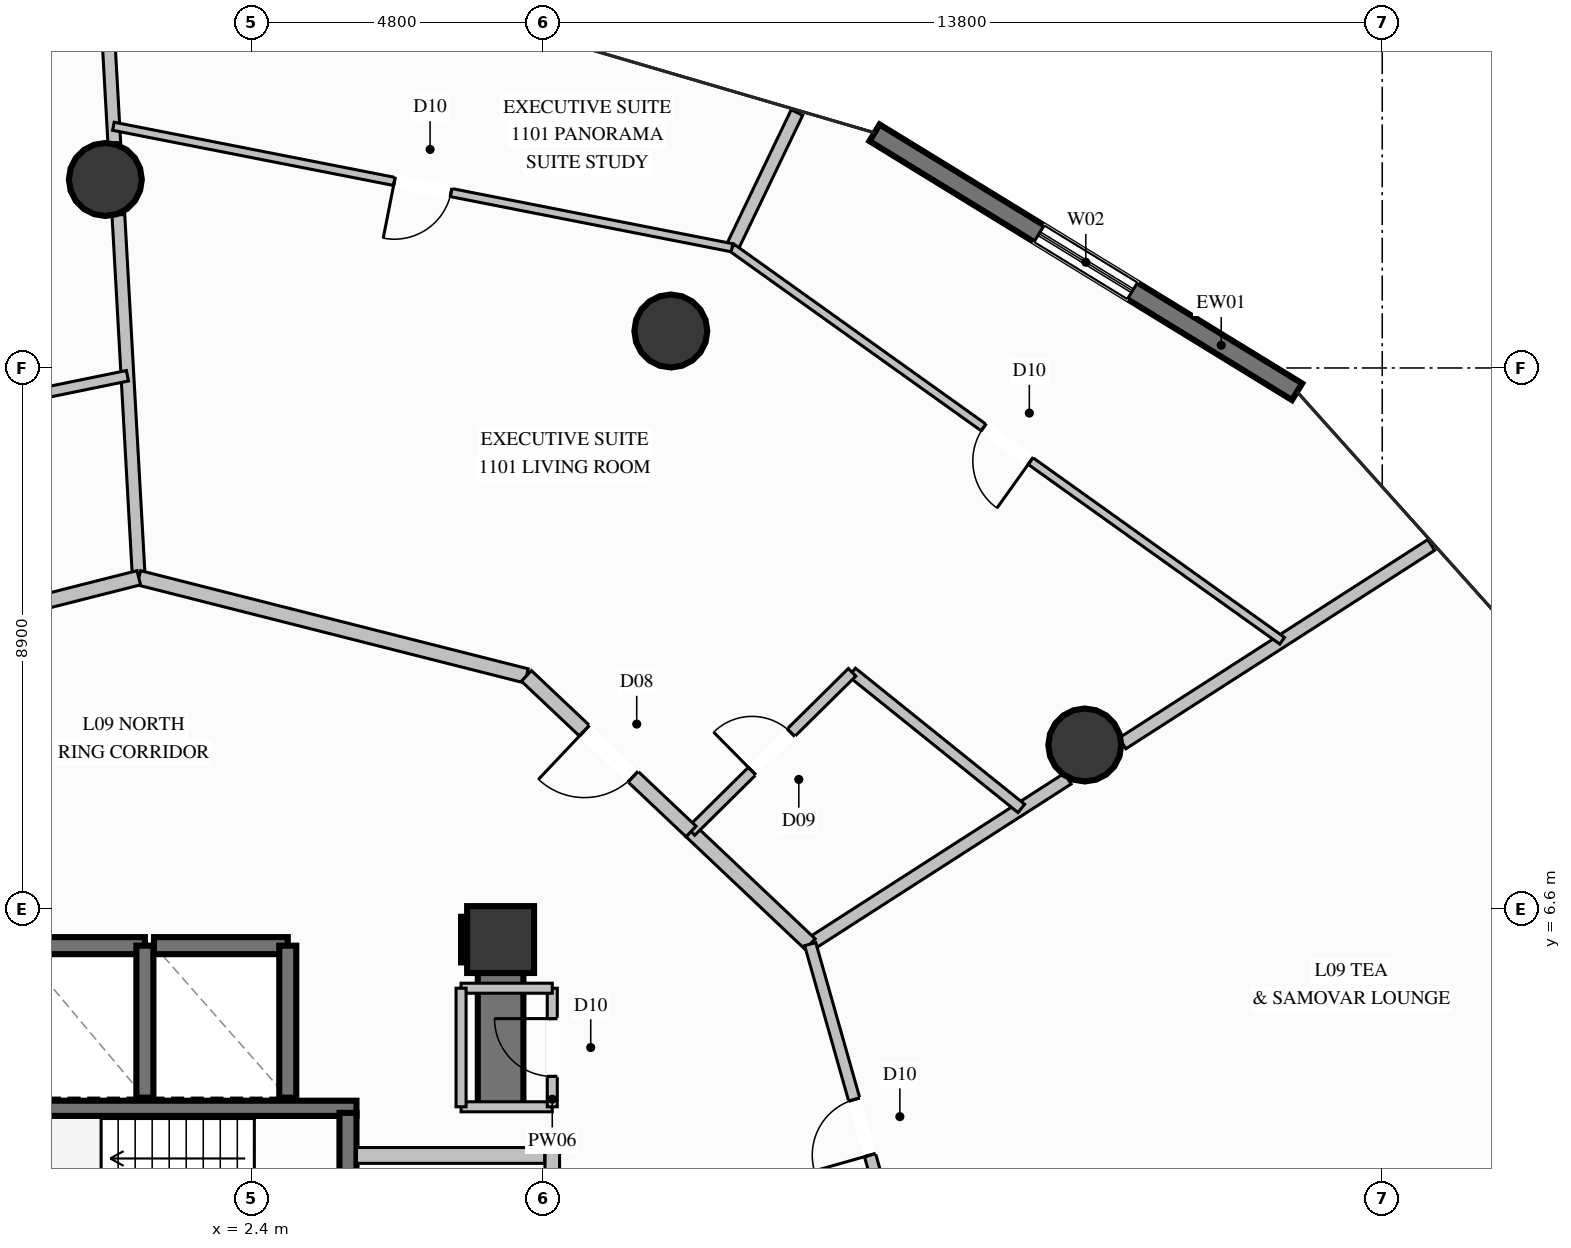
"""IFC4 building model, lengths in metres.
Left out: names, types, materials, properties, quantities, classifications, styles, units other than length and angle.
Written with IfcOpenShell. Run it as: python <this file> out.ifc"""

import sys

from ifc_helpers import new_model, si_unit, direction, frame, frame_2d, origin, origin_2d, place, context, subcontext, project, spatial, rectangle, circle, extrude, element, fill, save


model = new_model("IFC4")
c1 = context("Model", 3, precision=1e-05, world=origin(), true_north=direction((0.0, 1.0)))
c2 = subcontext(c1, "Body", "Model", "MODEL_VIEW")
j1 = project(units=[si_unit("LENGTHUNIT", "METRE"), si_unit("PLANEANGLEUNIT", "RADIAN")], contexts=[c1])
p1 = place(None, origin())
s1 = spatial("IfcSite", under=j1, at=p1, CompositionType="ELEMENT")
p2 = place(p1, origin())
s2 = spatial("IfcBuilding", under=s1, at=p2, CompositionType="ELEMENT")
p3 = place(p2, frame((0.0, 0.0, 42.8)))
s3 = spatial("IfcBuildingStorey", under=s2, at=p3, CompositionType="ELEMENT", Elevation=42.8)
p4 = place(p3, frame((6.5, 6.1, 0.0), z_axis=(0.0, 0.0, 1.0), x_axis=(1.0, 0.0, 0.0)))
e1 = element("IfcColumn", 1, at=p4, inside=s3, PredefinedType="COLUMN", context=c2, shape_type="SweptSolid", body=[
    extrude(rectangle(XDim=1.1, YDim=1.1, at=origin_2d()), origin(), (0.0, 0.0, 1.0), 3.6),
])
p5 = place(p3, frame((-4.13, 3.325, 0.0), z_axis=(0.0, 0.0, 1.0), x_axis=(1.0, 0.0, 0.0)))
e2 = element("IfcWall", 2, at=p5, inside=s3, PredefinedType="SOLIDWALL", context=c2, shape_type="SweptSolid", body=[
    extrude(rectangle(XDim=8.26, YDim=0.25, at=frame_2d((4.13, 0.0))), origin(), (0.0, 0.0, 1.0), 3.6),
])
p6 = place(p3, frame((5.85, 6.1, 0.0), z_axis=(0.0, 0.0, 1.0), x_axis=(1.0, 0.0, 0.0)))
e3 = element("IfcWall", 3, at=p6, inside=s3, PredefinedType="SHEAR", context=c2, shape_type="SweptSolid", body=[
    extrude(rectangle(XDim=0.275, YDim=0.75, at=frame_2d((0.137, 0.0))), origin(), (0.0, 0.0, 1.0), 3.6),
])
p7 = place(p3, frame((6.5, 3.35, 0.0), z_axis=(0.0, 0.0, 1.0), x_axis=(0.0, 1.0, 0.0)))
e4 = element("IfcWall", 4, at=p7, inside=s3, PredefinedType="SHEAR", context=c2, shape_type="SweptSolid", body=[
    extrude(rectangle(XDim=3.125, YDim=0.75, at=frame_2d((1.562, 0.0))), origin(), (0.0, 0.0, 1.0), 3.6),
])
for number, where, z_axis, x_axis in (
    (5, (16.108, 9.3, 0.0), (0.0, 0.0, 1.0), (1.0, 0.0, 0.0)),
    (6, (9.3, 16.108, 0.0), (0.0, 0.0, 1.0), (1.0, 0.0, 0.0)),
    (7, (0.0, 18.6, 0.0), (0.0, 0.0, 1.0), (1.0, 0.0, 0.0)),
):
    element("IfcColumn", number, at=place(p3, frame(where, z_axis=z_axis, x_axis=x_axis)), inside=s3, PredefinedType="COLUMN", context=c2, shape_type="SweptSolid", body=[
        extrude(circle(Radius=0.6, at=origin_2d()), origin(), (0.0, 0.0, 1.0), 3.6),
    ])
p8 = place(p3, frame((12.65, 19.368, 0.0), z_axis=(0.0, 0.0, 1.0), x_axis=(0.852610292859, -0.522547307438, 0.0)))
e8 = element("IfcWall", 8, at=p8, inside=s3, PredefinedType="SOLIDWALL", context=c2, shape_type="SweptSolid", body=[
    extrude(rectangle(XDim=8.151, YDim=0.32, at=frame_2d((4.075, 0.0))), origin(), (0.0, 0.0, 1.0), 3.34),
])
p9 = place(p8, frame((3.175, 0.0, 0.35)))
e9 = element("IfcOpeningElement", 9, at=p9, cuts=e8, PredefinedType="OPENING", context=c2, shape_type="SweptSolid", body=[
    extrude(rectangle(XDim=1.8, YDim=2.6, at=frame_2d((0.9, 1.3))), frame((0.0, 0.17, 0.0), z_axis=(0.0, -1.0, 0.0), x_axis=(1.0, 0.0, 0.0)), (0.0, 0.0, 1.0), 0.34),
])
p10 = place(p3, frame((0.65, 6.0, 0.0), z_axis=(0.0, 0.0, 1.0), x_axis=(-1.0, 0.0, 0.0)))
e10 = element("IfcWall", 10, at=p10, inside=s3, PredefinedType="SOLIDWALL", context=c2, shape_type="SweptSolid", body=[
    extrude(rectangle(XDim=2.1, YDim=0.28, at=frame_2d((1.05, 0.0))), origin(), (0.0, 0.0, 1.0), 3.34),
])
p11 = place(p3, frame((0.65, 3.5, 0.0), z_axis=(0.0, 0.0, 1.0), x_axis=(0.0, 1.0, 0.0)))
e11 = element("IfcWall", 11, at=p11, inside=s3, PredefinedType="SOLIDWALL", context=c2, shape_type="SweptSolid", body=[
    extrude(rectangle(XDim=2.5, YDim=0.28, at=frame_2d((1.25, 0.0))), origin(), (0.0, 0.0, 1.0), 3.34),
])
p12 = place(p3, frame((3.0, 6.0, 0.0), z_axis=(0.0, 0.0, 1.0), x_axis=(-1.0, 0.0, 0.0)))
e12 = element("IfcWall", 12, at=p12, inside=s3, PredefinedType="SOLIDWALL", context=c2, shape_type="SweptSolid", body=[
    extrude(rectangle(XDim=2.2, YDim=0.28, at=frame_2d((1.1, 0.0))), origin(), (0.0, 0.0, 1.0), 3.34),
])
p13 = place(p3, frame((3.0, 3.5, 0.0), z_axis=(0.0, 0.0, 1.0), x_axis=(0.0, 1.0, 0.0)))
e13 = element("IfcWall", 13, at=p13, inside=s3, PredefinedType="SOLIDWALL", context=c2, shape_type="SweptSolid", body=[
    extrude(rectangle(XDim=2.5, YDim=0.28, at=frame_2d((1.25, 0.0))), origin(), (0.0, 0.0, 1.0), 3.34),
])
p14 = place(p3, frame((3.99, -2.21, 0.0), z_axis=(0.0, 0.0, 1.0), x_axis=(0.0, 1.0, 0.0)))
e14 = element("IfcWall", 14, at=p14, inside=s3, PredefinedType="SOLIDWALL", context=c2, shape_type="SweptSolid", body=[
    extrude(rectangle(XDim=5.46, YDim=0.28, at=frame_2d((2.73, 0.0))), origin(), (0.0, 0.0, 1.0), 3.34),
])
p15 = place(p14, frame((3.323, 0.0, 0.0)))
e15 = element("IfcOpeningElement", 15, at=p15, cuts=e14, PredefinedType="OPENING", context=c2, shape_type="SweptSolid", body=[
    extrude(rectangle(XDim=1.2, YDim=2.2, at=frame_2d((0.6, 1.1))), frame((0.0, 0.15, 0.0), z_axis=(0.0, -1.0, 0.0), x_axis=(1.0, 0.0, 0.0)), (0.0, 0.0, 1.0), 0.3),
])
p16 = place(p3, frame((7.35, -2.34, 0.0), z_axis=(0.0, 0.0, 1.0), x_axis=(0.0, 1.0, 0.0)))
e16 = element("IfcWall", 16, at=p16, inside=s3, PredefinedType="PARTITIONING", context=c2, shape_type="SweptSolid", body=[
    extrude(rectangle(XDim=5.02, YDim=0.24, at=frame_2d((2.51, 0.0))), origin(), (0.0, 0.0, 1.0), 2.425),
])
p17 = place(p16, frame((2.515, 0.0, 0.0)))
e17 = element("IfcOpeningElement", 17, at=p17, cuts=e16, PredefinedType="OPENING", context=c2, shape_type="SweptSolid", body=[
    extrude(rectangle(XDim=1.15, YDim=2.2, at=frame_2d((0.575, 1.1))), frame((0.0, 0.13, 0.0), z_axis=(0.0, -1.0, 0.0), x_axis=(1.0, 0.0, 0.0)), (0.0, 0.0, 1.0), 0.26),
])
p18 = place(p3, frame((4.13, 2.55, 0.0), z_axis=(0.0, 0.0, 1.0), x_axis=(1.0, 0.0, 0.0)))
e18 = element("IfcWall", 18, at=p18, inside=s3, PredefinedType="PARTITIONING", context=c2, shape_type="SweptSolid", body=[
    extrude(rectangle(XDim=3.095, YDim=0.26, at=frame_2d((1.548, 0.0))), origin(), (0.0, 0.0, 1.0), 3.34),
])
p19 = place(p3, frame((5.85, 3.35, 0.0), z_axis=(0.0, 0.0, 1.0), x_axis=(1.0, 0.0, 0.0)))
e19 = element("IfcWall", 19, at=p19, inside=s3, PredefinedType="PARTITIONING", context=c2, shape_type="SweptSolid", body=[
    extrude(rectangle(XDim=1.5, YDim=0.165, at=frame_2d((0.75, 0.0))), origin(), (0.0, 0.0, 1.0), 3.34),
])
p20 = place(p3, frame((7.35, 3.35, 0.0), z_axis=(0.0, 0.0, 1.0), x_axis=(0.0, 1.0, 0.0)))
e20 = element("IfcWall", 20, at=p20, inside=s3, PredefinedType="PARTITIONING", context=c2, shape_type="SweptSolid", body=[
    extrude(rectangle(XDim=1.95, YDim=0.165, at=frame_2d((0.975, 0.0))), origin(), (0.0, 0.0, 1.0), 3.34),
])
p21 = place(p20, frame((0.5, 0.0, 0.0)))
e21 = element("IfcOpeningElement", 21, at=p21, cuts=e20, PredefinedType="OPENING", context=c2, shape_type="SweptSolid", body=[
    extrude(rectangle(XDim=0.95, YDim=2.1, at=frame_2d((0.475, 1.05))), frame((0.0, 0.093, 0.0), z_axis=(0.0, -1.0, 0.0), x_axis=(1.0, 0.0, 0.0)), (0.0, 0.0, 1.0), 0.185),
])
p22 = place(p3, frame((7.35, 5.3, 0.0), z_axis=(0.0, 0.0, 1.0), x_axis=(-1.0, 0.0, 0.0)))
e22 = element("IfcWall", 22, at=p22, inside=s3, PredefinedType="PARTITIONING", context=c2, shape_type="SweptSolid", body=[
    extrude(rectangle(XDim=1.5, YDim=0.165, at=frame_2d((0.75, 0.0))), origin(), (0.0, 0.0, 1.0), 2.425),
])
p23 = place(p3, frame((5.85, 5.3, 0.0), z_axis=(0.0, 0.0, 1.0), x_axis=(0.0, -1.0, 0.0)))
e23 = element("IfcWall", 23, at=p23, inside=s3, PredefinedType="PARTITIONING", context=c2, shape_type="SweptSolid", body=[
    extrude(rectangle(XDim=1.95, YDim=0.165, at=frame_2d((0.975, 0.0))), origin(), (0.0, 0.0, 1.0), 2.425),
])
p24 = place(p3, frame((11.592, 6.025, 0.0), z_axis=(0.0, 0.0, 1.0), x_axis=(0.841200533938, 0.540723276456, 0.0)))
e24 = element("IfcWall", 24, at=p24, inside=s3, PredefinedType="PARTITIONING", context=c2, shape_type="SweptSolid", body=[
    extrude(rectangle(XDim=5.034, YDim=0.21, at=frame_2d((2.517, 0.0))), origin(), (0.0, 0.0, 1.0), 2.708),
])
p25 = place(p3, frame((16.727, 9.326, 0.0), z_axis=(0.0, 0.0, 1.0), x_axis=(0.84126651409, 0.54062061769, 0.0)))
e25 = element("IfcWall", 25, at=p25, inside=s3, PredefinedType="PARTITIONING", context=c2, shape_type="SweptSolid", body=[
    extrude(rectangle(XDim=6.036, YDim=0.21, at=frame_2d((3.018, 0.0))), origin(), (0.0, 0.0, 1.0), 3.34),
])
p26 = place(p3, frame((0.55, 12.05, 0.0), z_axis=(0.0, 0.0, 1.0), x_axis=(-0.056200663667, 0.998419493702, 0.0)))
e26 = element("IfcWall", 26, at=p26, inside=s3, PredefinedType="PARTITIONING", context=c2, shape_type="SweptSolid", body=[
    extrude(rectangle(XDim=5.978, YDim=0.21, at=frame_2d((2.989, 0.0))), origin(), (0.0, 0.0, 1.0), 2.708),
])
p27 = place(p3, frame((0.147, 19.202, 0.0), z_axis=(0.0, 0.0, 1.0), x_axis=(-0.056047530515, 0.99842810173, 0.0)))
e27 = element("IfcWall", 27, at=p27, inside=s3, PredefinedType="PARTITIONING", context=c2, shape_type="SweptSolid", body=[
    extrude(rectangle(XDim=2.622, YDim=0.21, at=frame_2d((1.311, 0.0))), origin(), (0.0, 0.0, 1.0), 3.34),
])
p28 = place(p3, frame((11.592, 6.025, 0.0), z_axis=(0.0, 0.0, 1.0), x_axis=(-0.726651583854, 0.687006168591, 0.0)))
e28 = element("IfcWall", 28, at=p28, inside=s3, PredefinedType="PARTITIONING", context=c2, shape_type="SweptSolid", body=[
    extrude(rectangle(XDim=2.697, YDim=0.24, at=frame_2d((1.349, 0.0))), origin(), (0.0, 0.0, 1.0), 3.34),
])
p29 = place(p3, frame((15.064, 8.257, 0.0), z_axis=(0.0, 0.0, 1.0), x_axis=(-0.779272237284, 0.626685551292, 0.0)))
e29 = element("IfcWall", 29, at=p29, inside=s3, PredefinedType="PLUMBINGWALL", context=c2, shape_type="SweptSolid", body=[
    extrude(rectangle(XDim=3.571, YDim=0.175, at=frame_2d((1.786, 0.0))), origin(), (0.0, 0.0, 1.0), 3.34),
])
p30 = place(p3, frame((9.632, 7.878, 0.0), z_axis=(0.0, 0.0, 1.0), x_axis=(0.711355516102, 0.702832362453, 0.0)))
e30 = element("IfcWall", 30, at=p30, inside=s3, PredefinedType="PLUMBINGWALL", context=c2, shape_type="SweptSolid", body=[
    extrude(rectangle(XDim=3.724, YDim=0.175, at=frame_2d((1.862, 0.0))), origin(), (0.0, 0.0, 1.0), 3.34),
])
p31 = place(p30, frame((1.412, 0.0, 0.0)))
e31 = element("IfcOpeningElement", 31, at=p31, cuts=e30, PredefinedType="OPENING", context=c2, shape_type="SweptSolid", body=[
    extrude(rectangle(XDim=0.9, YDim=2.1, at=frame_2d((0.45, 1.05))), frame((0.0, 0.098, 0.0), z_axis=(0.0, -1.0, 0.0), x_axis=(1.0, 0.0, 0.0)), (0.0, 0.0, 1.0), 0.195),
])
p32 = place(p3, frame((10.306, 17.477, 0.0), z_axis=(0.0, 0.0, 1.0), x_axis=(0.43294660359, 0.901419568481, 0.0)))
e32 = element("IfcWall", 32, at=p32, inside=s3, PredefinedType="PARTITIONING", context=c2, shape_type="SweptSolid", body=[
    extrude(rectangle(XDim=2.467, YDim=0.21, at=frame_2d((1.233, 0.0))), origin(), (0.0, 0.0, 1.0), 3.34),
])
p33 = place(p3, frame((6.925, 10.436, 0.0), z_axis=(0.0, 0.0, 1.0), x_axis=(-0.969413132073, 0.245434674331, 0.0)))
e33 = element("IfcWall", 33, at=p33, inside=s3, PredefinedType="PARTITIONING", context=c2, shape_type="SweptSolid", body=[
    extrude(rectangle(XDim=6.576, YDim=0.24, at=frame_2d((3.288, 0.0))), origin(), (0.0, 0.0, 1.0), 2.918),
])
p34 = place(p3, frame((9.632, 7.878, 0.0), z_axis=(0.0, 0.0, 1.0), x_axis=(-0.726816794063, 0.686831382413, 0.0)))
e34 = element("IfcWall", 34, at=p34, inside=s3, PredefinedType="PARTITIONING", context=c2, shape_type="SweptSolid", body=[
    extrude(rectangle(XDim=3.725, YDim=0.24, at=frame_2d((1.862, 0.0))), origin(), (0.0, 0.0, 1.0), 3.34),
])
p35 = place(p34, frame((1.312, 0.0, 0.0)))
e35 = element("IfcOpeningElement", 35, at=p35, cuts=e34, PredefinedType="OPENING", context=c2, shape_type="SweptSolid", body=[
    extrude(rectangle(XDim=1.1, YDim=2.3, at=frame_2d((0.55, 1.15))), frame((0.0, 0.13, 0.0), z_axis=(0.0, -1.0, 0.0), x_axis=(1.0, 0.0, 0.0)), (0.0, 0.0, 1.0), 0.26),
])
p36 = place(p3, frame((19.354, 11.014, 0.0), z_axis=(0.0, 0.0, 1.0), x_axis=(-0.813724569885, 0.581250655367, 0.0)))
e36 = element("IfcWall", 36, at=p36, inside=s3, PredefinedType="PARTITIONING", context=c2, shape_type="SweptSolid", body=[
    extrude(rectangle(XDim=11.119, YDim=0.135, at=frame_2d((5.56, 0.0))), origin(), (0.0, 0.0, 1.0), 3.34),
])
p37 = place(p36, frame((5.085, 0.0, 0.0)))
e37 = element("IfcOpeningElement", 37, at=p37, cuts=e36, PredefinedType="OPENING", context=c2, shape_type="SweptSolid", body=[
    extrude(rectangle(XDim=0.95, YDim=2.1, at=frame_2d((0.475, 1.05))), frame((0.0, 0.078, 0.0), z_axis=(0.0, -1.0, 0.0), x_axis=(1.0, 0.0, 0.0)), (0.0, 0.0, 1.0), 0.155),
])
p38 = place(p3, frame((10.306, 17.477, 0.0), z_axis=(0.0, 0.0, 1.0), x_axis=(-0.981255818222, 0.192709675953, 0.0)))
e38 = element("IfcWall", 38, at=p38, inside=s3, PredefinedType="PARTITIONING", context=c2, shape_type="SweptSolid", body=[
    extrude(rectangle(XDim=10.368, YDim=0.135, at=frame_2d((5.184, 0.0))), origin(), (0.0, 0.0, 1.0), 3.34),
])
p39 = place(p38, frame((4.709, 0.0, 0.0)))
e39 = element("IfcOpeningElement", 39, at=p39, cuts=e38, PredefinedType="OPENING", context=c2, shape_type="SweptSolid", body=[
    extrude(rectangle(XDim=0.95, YDim=2.1, at=frame_2d((0.475, 1.05))), frame((0.0, 0.078, 0.0), z_axis=(0.0, -1.0, 0.0), x_axis=(1.0, 0.0, 0.0)), (0.0, 0.0, 1.0), 0.155),
])
p40 = place(p3, frame((0.55, 12.05, 0.0), z_axis=(0.0, 0.0, 1.0), x_axis=(-0.969394271919, -0.245509155779, 0.0)))
e40 = element("IfcWall", 40, at=p40, inside=s3, PredefinedType="PARTITIONING", context=c2, shape_type="SweptSolid", body=[
    extrude(rectangle(XDim=2.761, YDim=0.24, at=frame_2d((1.381, 0.0))), origin(), (0.0, 0.0, 1.0), 2.918),
])
p41 = place(p3, frame((0.363, 15.372, 0.0), z_axis=(0.0, 0.0, 1.0), x_axis=(-0.979691208228, -0.200512185465, 0.0)))
e41 = element("IfcWall", 41, at=p41, inside=s3, PredefinedType="PLUMBINGWALL", context=c2, shape_type="SweptSolid", body=[
    extrude(rectangle(XDim=3.491, YDim=0.175, at=frame_2d((1.745, 0.0))), origin(), (0.0, 0.0, 1.0), 3.34),
])
p42 = place(p3, frame((13.3, 0.0, 0.0), z_axis=(0.0, 0.0, 1.0), x_axis=(-0.272743314702, 0.962086838225, 0.0)))
e42 = element("IfcWall", 42, at=p42, inside=s3, PredefinedType="PARTITIONING", context=c2, shape_type="SweptSolid", body=[
    extrude(rectangle(XDim=6.262, YDim=0.19, at=frame_2d((3.131, 0.0))), origin(), (0.0, 0.0, 1.0), 2.918),
])
p43 = place(p42, frame((2.656, 0.0, 0.0)))
e43 = element("IfcOpeningElement", 43, at=p43, cuts=e42, PredefinedType="OPENING", context=c2, shape_type="SweptSolid", body=[
    extrude(rectangle(XDim=0.95, YDim=2.1, at=frame_2d((0.475, 1.05))), frame((0.0, 0.105, 0.0), z_axis=(0.0, -1.0, 0.0), x_axis=(1.0, 0.0, 0.0)), (0.0, 0.0, 1.0), 0.21),
])
p44 = place(p9, origin())
e44 = element("IfcWindow", 44, at=p44, inside=s3, PartitioningType="SINGLE_PANEL", PredefinedType="WINDOW", context=c2, shape_type="SweptSolid", body=[
    extrude(rectangle(XDim=1.8, YDim=2.6, at=frame_2d((0.9, 1.3))), frame((0.0, 0.03, 0.0), z_axis=(0.0, -1.0, 0.0), x_axis=(1.0, 0.0, 0.0)), (0.0, 0.0, 1.0), 0.06),
])
fill(e9, e44)
p45 = place(p21, origin())
e45 = element("IfcDoor", 45, at=p45, inside=s3, OperationType="SINGLE_SWING_RIGHT", PredefinedType="DOOR", context=c2, shape_type="SweptSolid", body=[
    extrude(rectangle(XDim=0.95, YDim=2.1, at=frame_2d((0.475, 1.05))), frame((0.0, 0.025, 0.0), z_axis=(0.0, -1.0, 0.0), x_axis=(1.0, 0.0, 0.0)), (0.0, 0.0, 1.0), 0.05),
])
fill(e21, e45)
p46 = place(p31, origin())
e46 = element("IfcDoor", 46, at=p46, inside=s3, OperationType="SINGLE_SWING_LEFT", PredefinedType="DOOR", context=c2, shape_type="SweptSolid", body=[
    extrude(rectangle(XDim=0.9, YDim=2.1, at=frame_2d((0.45, 1.05))), frame((0.0, 0.025, 0.0), z_axis=(0.0, -1.0, 0.0), x_axis=(1.0, 0.0, 0.0)), (0.0, 0.0, 1.0), 0.05),
])
fill(e31, e46)
p47 = place(p35, origin())
e47 = element("IfcDoor", 47, at=p47, inside=s3, OperationType="SINGLE_SWING_RIGHT", PredefinedType="DOOR", context=c2, shape_type="SweptSolid", body=[
    extrude(rectangle(XDim=1.1, YDim=2.3, at=frame_2d((0.55, 1.15))), frame((0.0, 0.025, 0.0), z_axis=(0.0, -1.0, 0.0), x_axis=(1.0, 0.0, 0.0)), (0.0, 0.0, 1.0), 0.05),
])
fill(e35, e47)
p48 = place(p37, origin())
e48 = element("IfcDoor", 48, at=p48, inside=s3, OperationType="SINGLE_SWING_LEFT", PredefinedType="DOOR", context=c2, shape_type="SweptSolid", body=[
    extrude(rectangle(XDim=0.95, YDim=2.1, at=frame_2d((0.475, 1.05))), frame((0.0, 0.025, 0.0), z_axis=(0.0, -1.0, 0.0), x_axis=(1.0, 0.0, 0.0)), (0.0, 0.0, 1.0), 0.05),
])
fill(e37, e48)
p49 = place(p39, origin())
e49 = element("IfcDoor", 49, at=p49, inside=s3, OperationType="SINGLE_SWING_RIGHT", PredefinedType="DOOR", context=c2, shape_type="SweptSolid", body=[
    extrude(rectangle(XDim=0.95, YDim=2.1, at=frame_2d((0.475, 1.05))), frame((0.0, 0.025, 0.0), z_axis=(0.0, -1.0, 0.0), x_axis=(1.0, 0.0, 0.0)), (0.0, 0.0, 1.0), 0.05),
])
fill(e39, e49)
p50 = place(p43, origin())
e50 = element("IfcDoor", 50, at=p50, inside=s3, OperationType="SINGLE_SWING_LEFT", PredefinedType="DOOR", context=c2, shape_type="SweptSolid", body=[
    extrude(rectangle(XDim=0.95, YDim=2.1, at=frame_2d((0.475, 1.05))), frame((0.0, 0.025, 0.0), z_axis=(0.0, -1.0, 0.0), x_axis=(1.0, 0.0, 0.0)), (0.0, 0.0, 1.0), 0.05),
])
fill(e43, e50)
save(model, sys.argv[1])
